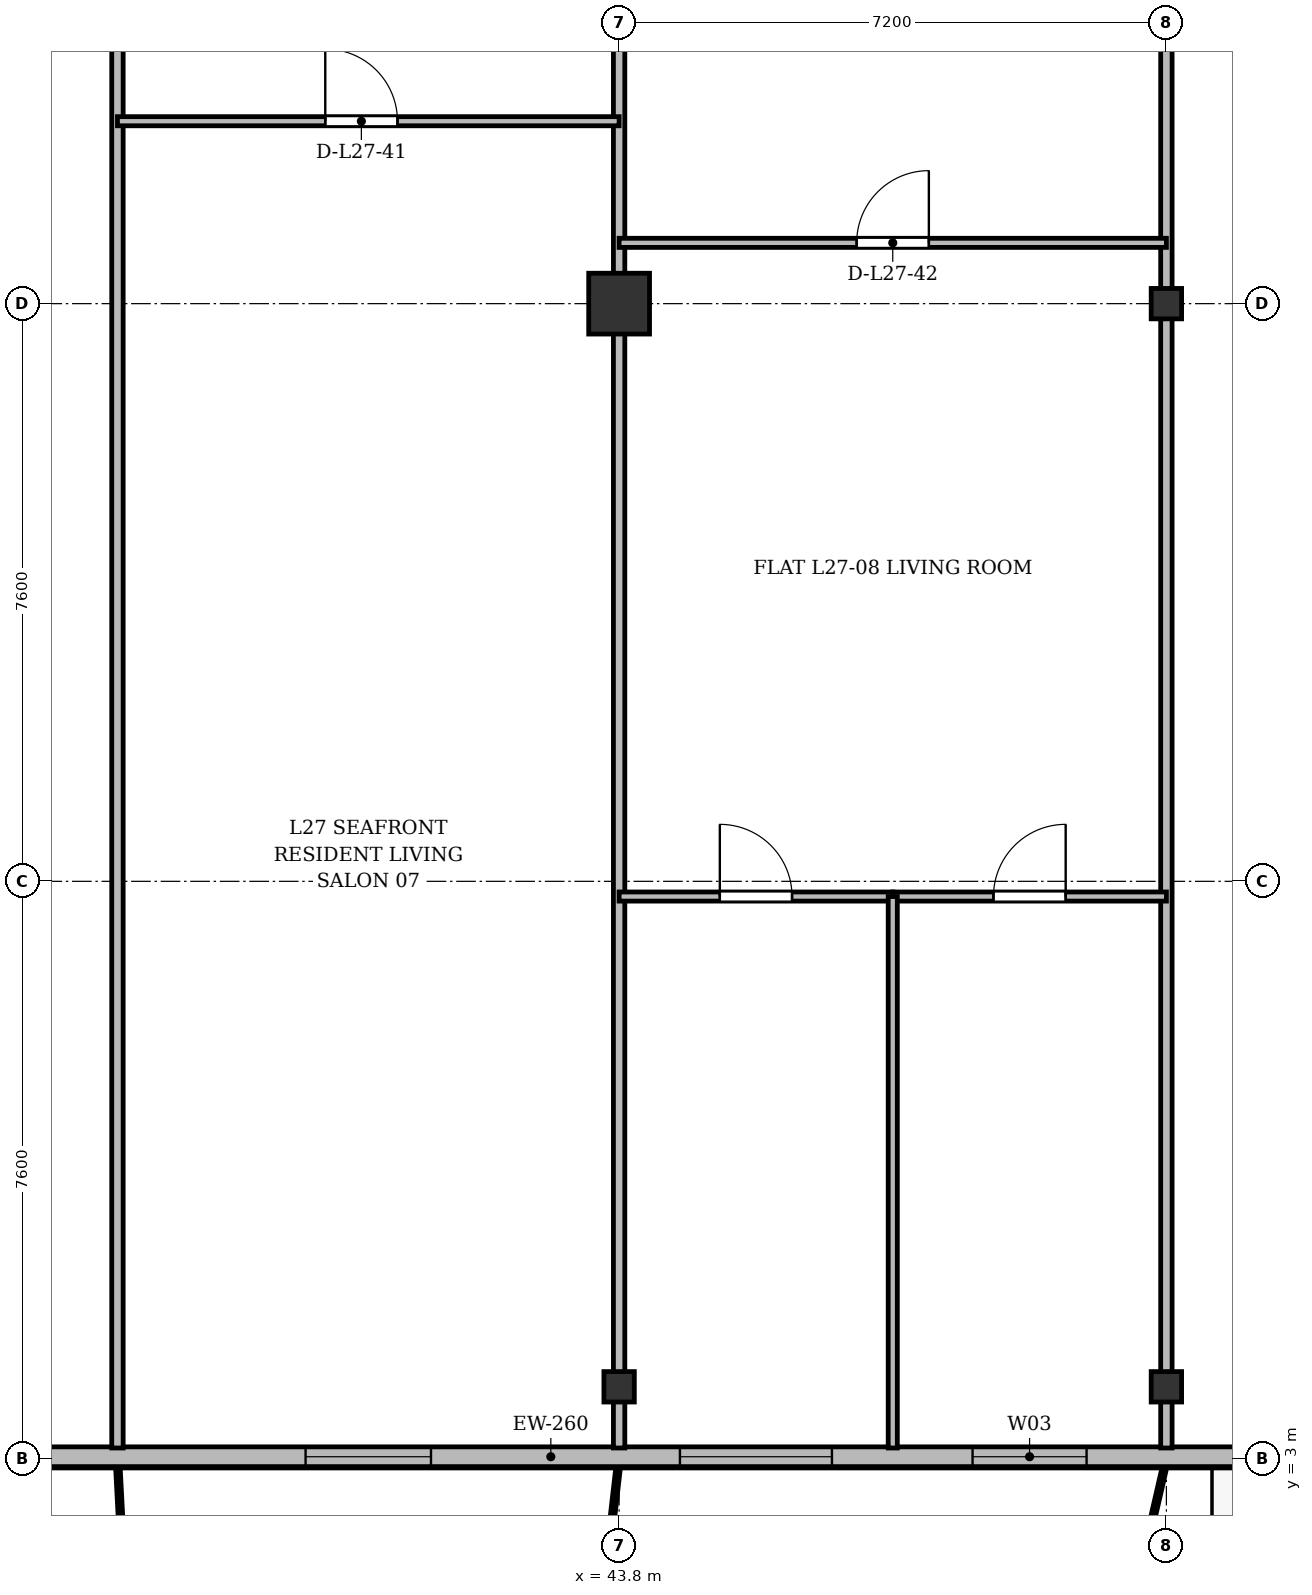
"""IFC4 building model, lengths in metres.
Left out: names, types, materials, properties, quantities, classifications, styles, units other than length and angle.
Written with IfcOpenShell. Run it as: python <this file> out.ifc"""

import sys

from ifc_helpers import new_model, si_unit, direction, frame, frame_2d, origin, origin_2d, place, context, subcontext, project, spatial, rectangle, i_section, extrude, source, transform, mapped, element, fill, save


model = new_model("IFC4")
c1 = context("Model", 3, precision=1e-05, world=origin(), true_north=direction((0.0, 1.0)))
c2 = subcontext(c1, "Body", "Model", "MODEL_VIEW")
j1 = project(units=[si_unit("LENGTHUNIT", "METRE"), si_unit("PLANEANGLEUNIT", "RADIAN")], contexts=[c1])
p1 = place(None, origin())
s1 = spatial("IfcSite", under=j1, at=p1, CompositionType="ELEMENT")
p2 = place(p1, origin())
s2 = spatial("IfcBuilding", under=s1, at=p2, CompositionType="ELEMENT")
p3 = place(p2, frame((0.0, 0.0, 106.9)))
s3 = spatial("IfcBuildingStorey", under=s2, at=p3, CompositionType="ELEMENT", Elevation=106.9)
m1 = source(origin(), c2, "Body", "SweptSolid", [
    extrude(i_section(OverallWidth=0.4, OverallDepth=0.4, WebThickness=0.022, FlangeThickness=0.035, at=origin_2d()), origin(), (0.0, 0.0, 1.0), 3.6),
])
p4 = place(p3, frame((43.8, 3.95, 0.0), z_axis=(0.0, 0.0, 1.0), x_axis=(1.0, 0.0, 0.0)))
e1 = element("IfcColumn", 1, at=p4, inside=s3, PredefinedType="COLUMN", context=c2, shape_type="MappedRepresentation", body=[
    mapped(m1, transform((0.0, 0.0, 0.0), x_axis=(1.0, 0.0, 0.0), y_axis=(0.0, 1.0, 0.0), z_axis=(0.0, 0.0, 1.0), scale=1.0)),
])
m2 = source(origin(), c2, "Body", "SweptSolid", [
    extrude(rectangle(XDim=0.8, YDim=0.8, at=origin_2d()), origin(), (0.0, 0.0, 1.0), 3.6),
])
p5 = place(p3, frame((43.8, 18.2, 0.0), z_axis=(0.0, 0.0, 1.0), x_axis=(1.0, 0.0, 0.0)))
e2 = element("IfcColumn", 2, at=p5, inside=s3, PredefinedType="COLUMN", context=c2, shape_type="MappedRepresentation", body=[
    mapped(m2, transform((0.0, 0.0, 0.0), x_axis=(1.0, 0.0, 0.0), y_axis=(0.0, 1.0, 0.0), z_axis=(0.0, 0.0, 1.0), scale=1.0)),
])
for number, where, z_axis, x_axis in (
    (3, (51.0, 3.95, 0.0), (0.0, 0.0, 1.0), (1.0, 0.0, 0.0)),
    (4, (51.0, 18.2, 0.0), (0.0, 0.0, 1.0), (1.0, 0.0, 0.0)),
):
    element("IfcColumn", number, at=place(p3, frame(where, z_axis=z_axis, x_axis=x_axis)), inside=s3, PredefinedType="COLUMN", context=c2, shape_type="MappedRepresentation", body=[
        mapped(m1, transform((0.0, 0.0, 0.0), x_axis=(1.0, 0.0, 0.0), y_axis=(0.0, 1.0, 0.0), z_axis=(0.0, 0.0, 1.0), scale=1.0)),
    ])
p6 = place(p3, frame((66.9, 3.03, 0.0), z_axis=(0.0, 0.0, 1.0), x_axis=(-1.0, 0.0, 0.0)))
e5 = element("IfcWall", 5, at=p6, inside=s3, PredefinedType="SOLIDWALL", context=c2, shape_type="SweptSolid", body=[
    extrude(rectangle(XDim=59.4, YDim=0.26, at=frame_2d((29.7, 0.0))), origin(), (0.0, 0.0, 1.0), 3.34),
])
p7 = place(p6, frame((2.0, 0.0, 0.9)))
e6 = element("IfcOpeningElement", 6, at=p7, cuts=e5, PredefinedType="OPENING", context=c2, shape_type="SweptSolid", body=[
    extrude(rectangle(XDim=2.0, YDim=1.95, at=frame_2d((1.0, 0.975))), frame((0.0, 0.14, 0.0), z_axis=(0.0, -1.0, 0.0), x_axis=(1.0, 0.0, 0.0)), (0.0, 0.0, 1.0), 0.28),
])
p8 = place(p6, frame((5.575, 0.0, 0.9)))
e7 = element("IfcOpeningElement", 7, at=p8, cuts=e5, PredefinedType="OPENING", context=c2, shape_type="SweptSolid", body=[
    extrude(rectangle(XDim=1.65, YDim=1.85, at=frame_2d((0.825, 0.925))), frame((0.0, 0.14, 0.0), z_axis=(0.0, -1.0, 0.0), x_axis=(1.0, 0.0, 0.0)), (0.0, 0.0, 1.0), 0.28),
])
p9 = place(p6, frame((9.213, 0.0, 0.0)))
e8 = element("IfcOpeningElement", 8, at=p9, cuts=e5, PredefinedType="OPENING", context=c2, shape_type="SweptSolid", body=[
    extrude(rectangle(XDim=1.2, YDim=2.2, at=frame_2d((0.6, 1.1))), frame((0.0, 0.14, 0.0), z_axis=(0.0, -1.0, 0.0), x_axis=(1.0, 0.0, 0.0)), (0.0, 0.0, 1.0), 0.28),
])
p10 = place(p6, frame((12.8, 0.0, 0.9)))
e9 = element("IfcOpeningElement", 9, at=p10, cuts=e5, PredefinedType="OPENING", context=c2, shape_type="SweptSolid", body=[
    extrude(rectangle(XDim=2.2, YDim=1.8, at=frame_2d((1.1, 0.9))), frame((0.0, 0.14, 0.0), z_axis=(0.0, -1.0, 0.0), x_axis=(1.0, 0.0, 0.0)), (0.0, 0.0, 1.0), 0.28),
])
p11 = place(p6, frame((16.95, 0.0, 0.9)))
e10 = element("IfcOpeningElement", 10, at=p11, cuts=e5, PredefinedType="OPENING", context=c2, shape_type="SweptSolid", body=[
    extrude(rectangle(XDim=1.5, YDim=1.75, at=frame_2d((0.75, 0.875))), frame((0.0, 0.14, 0.0), z_axis=(0.0, -1.0, 0.0), x_axis=(1.0, 0.0, 0.0)), (0.0, 0.0, 1.0), 0.28),
])
p12 = place(p6, frame((20.3, 0.0, 0.9)))
e11 = element("IfcOpeningElement", 11, at=p12, cuts=e5, PredefinedType="OPENING", context=c2, shape_type="SweptSolid", body=[
    extrude(rectangle(XDim=2.0, YDim=1.95, at=frame_2d((1.0, 0.975))), frame((0.0, 0.14, 0.0), z_axis=(0.0, -1.0, 0.0), x_axis=(1.0, 0.0, 0.0)), (0.0, 0.0, 1.0), 0.28),
])
p13 = place(p6, frame((25.575, 0.0, 0.9)))
e12 = element("IfcOpeningElement", 12, at=p13, cuts=e5, PredefinedType="OPENING", context=c2, shape_type="SweptSolid", body=[
    extrude(rectangle(XDim=1.65, YDim=1.85, at=frame_2d((0.825, 0.925))), frame((0.0, 0.14, 0.0), z_axis=(0.0, -1.0, 0.0), x_axis=(1.0, 0.0, 0.0)), (0.0, 0.0, 1.0), 0.28),
])
p14 = place(p6, frame((32.1, 0.0, 0.9)))
e13 = element("IfcOpeningElement", 13, at=p14, cuts=e5, PredefinedType="OPENING", context=c2, shape_type="SweptSolid", body=[
    extrude(rectangle(XDim=1.8, YDim=1.8, at=frame_2d((0.9, 0.9))), frame((0.0, 0.14, 0.0), z_axis=(0.0, -1.0, 0.0), x_axis=(1.0, 0.0, 0.0)), (0.0, 0.0, 1.0), 0.28),
])
p15 = place(p6, frame((37.584, 0.0, 0.0)))
e14 = element("IfcOpeningElement", 14, at=p15, cuts=e5, PredefinedType="OPENING", context=c2, shape_type="SweptSolid", body=[
    extrude(rectangle(XDim=1.2, YDim=2.2, at=frame_2d((0.6, 1.1))), frame((0.0, 0.14, 0.0), z_axis=(0.0, -1.0, 0.0), x_axis=(1.0, 0.0, 0.0)), (0.0, 0.0, 1.0), 0.28),
])
p16 = place(p6, frame((40.85, 0.0, 0.9)))
e15 = element("IfcOpeningElement", 15, at=p16, cuts=e5, PredefinedType="OPENING", context=c2, shape_type="SweptSolid", body=[
    extrude(rectangle(XDim=1.5, YDim=1.75, at=frame_2d((0.75, 0.875))), frame((0.0, 0.14, 0.0), z_axis=(0.0, -1.0, 0.0), x_axis=(1.0, 0.0, 0.0)), (0.0, 0.0, 1.0), 0.28),
])
p17 = place(p6, frame((46.4, 0.0, 0.9)))
e16 = element("IfcOpeningElement", 16, at=p17, cuts=e5, PredefinedType="OPENING", context=c2, shape_type="SweptSolid", body=[
    extrude(rectangle(XDim=2.0, YDim=1.95, at=frame_2d((1.0, 0.975))), frame((0.0, 0.14, 0.0), z_axis=(0.0, -1.0, 0.0), x_axis=(1.0, 0.0, 0.0)), (0.0, 0.0, 1.0), 0.28),
])
p18 = place(p6, frame((55.817, 0.0, 0.0)))
e17 = element("IfcOpeningElement", 17, at=p18, cuts=e5, PredefinedType="OPENING", context=c2, shape_type="SweptSolid", body=[
    extrude(rectangle(XDim=1.2, YDim=2.2, at=frame_2d((0.6, 1.1))), frame((0.0, 0.14, 0.0), z_axis=(0.0, -1.0, 0.0), x_axis=(1.0, 0.0, 0.0)), (0.0, 0.0, 1.0), 0.28),
])
p19 = place(p3, frame((37.2, 3.145, 0.0), z_axis=(0.0, 0.0, 1.0), x_axis=(0.0, 1.0, 0.0)))
e18 = element("IfcWall", 18, at=p19, inside=s3, PredefinedType="PARTITIONING", context=c2, shape_type="SweptSolid", body=[
    extrude(rectangle(XDim=24.455, YDim=0.15, at=frame_2d((12.228, 0.0))), origin(), (0.0, 0.0, 1.0), 2.752),
])
for number, where, z_axis, x_axis in (
    (19, (43.8, 3.145, 0.0), (0.0, 0.0, 1.0), (0.0, 1.0, 0.0)),
    (20, (51.0, 3.145, 0.0), (0.0, 0.0, 1.0), (0.0, 1.0, 0.0)),
):
    element("IfcWall", number, at=place(p3, frame(where, z_axis=z_axis, x_axis=x_axis)), inside=s3, PredefinedType="PARTITIONING", context=c2, shape_type="SweptSolid", body=[
        extrude(rectangle(XDim=24.455, YDim=0.15, at=frame_2d((12.228, 0.0))), origin(), (0.0, 0.0, 1.0), 2.84),
    ])
p20 = place(p3, frame((37.2, 20.6, 0.0), z_axis=(0.0, 0.0, 1.0), x_axis=(1.0, 0.0, 0.0)))
e21 = element("IfcWall", 21, at=p20, inside=s3, PredefinedType="PARTITIONING", context=c2, shape_type="SweptSolid", body=[
    extrude(rectangle(XDim=6.6, YDim=0.12, at=frame_2d((3.3, 0.0))), origin(), (0.0, 0.0, 1.0), 2.84),
])
p21 = place(p20, frame((2.734, 0.0, 0.0)))
e22 = element("IfcOpeningElement", 22, at=p21, cuts=e21, PredefinedType="OPENING", context=c2, shape_type="SweptSolid", body=[
    extrude(rectangle(XDim=0.95, YDim=2.15, at=frame_2d((0.475, 1.075))), frame((0.0, 0.07, 0.0), z_axis=(0.0, -1.0, 0.0), x_axis=(1.0, 0.0, 0.0)), (0.0, 0.0, 1.0), 0.14),
])
p22 = place(p3, frame((43.8, 19.0, 0.0), z_axis=(0.0, 0.0, 1.0), x_axis=(1.0, 0.0, 0.0)))
e23 = element("IfcWall", 23, at=p22, inside=s3, PredefinedType="PARTITIONING", context=c2, shape_type="SweptSolid", body=[
    extrude(rectangle(XDim=7.2, YDim=0.12, at=frame_2d((3.6, 0.0))), origin(), (0.0, 0.0, 1.0), 2.84),
])
p23 = place(p22, frame((3.125, 0.0, 0.0)))
e24 = element("IfcOpeningElement", 24, at=p23, cuts=e23, PredefinedType="OPENING", context=c2, shape_type="SweptSolid", body=[
    extrude(rectangle(XDim=0.95, YDim=2.15, at=frame_2d((0.475, 1.075))), frame((0.0, 0.07, 0.0), z_axis=(0.0, -1.0, 0.0), x_axis=(1.0, 0.0, 0.0)), (0.0, 0.0, 1.0), 0.14),
])
p24 = place(p3, frame((43.8, 10.4, 0.0), z_axis=(0.0, 0.0, 1.0), x_axis=(1.0, 0.0, 0.0)))
e25 = element("IfcWall", 25, at=p24, inside=s3, PredefinedType="PARTITIONING", context=c2, shape_type="SweptSolid", body=[
    extrude(rectangle(XDim=3.6, YDim=0.12, at=frame_2d((1.8, 0.0))), origin(), (0.0, 0.0, 1.0), 2.84),
])
p25 = place(p24, frame((1.325, 0.0, 0.0)))
e26 = element("IfcOpeningElement", 26, at=p25, cuts=e25, PredefinedType="OPENING", context=c2, shape_type="SweptSolid", body=[
    extrude(rectangle(XDim=0.95, YDim=2.15, at=frame_2d((0.475, 1.075))), frame((0.0, 0.07, 0.0), z_axis=(0.0, -1.0, 0.0), x_axis=(1.0, 0.0, 0.0)), (0.0, 0.0, 1.0), 0.14),
])
p26 = place(p3, frame((47.4, 10.4, 0.0), z_axis=(0.0, 0.0, 1.0), x_axis=(1.0, 0.0, 0.0)))
e27 = element("IfcWall", 27, at=p26, inside=s3, PredefinedType="PARTITIONING", context=c2, shape_type="SweptSolid", body=[
    extrude(rectangle(XDim=3.6, YDim=0.12, at=frame_2d((1.8, 0.0))), origin(), (0.0, 0.0, 1.0), 2.84),
])
p27 = place(p26, frame((1.325, 0.0, 0.0)))
e28 = element("IfcOpeningElement", 28, at=p27, cuts=e27, PredefinedType="OPENING", context=c2, shape_type="SweptSolid", body=[
    extrude(rectangle(XDim=0.95, YDim=2.15, at=frame_2d((0.475, 1.075))), frame((0.0, 0.07, 0.0), z_axis=(0.0, -1.0, 0.0), x_axis=(1.0, 0.0, 0.0)), (0.0, 0.0, 1.0), 0.14),
])
p28 = place(p3, frame((47.4, 3.145, 0.0), z_axis=(0.0, 0.0, 1.0), x_axis=(0.0, 1.0, 0.0)))
e29 = element("IfcWall", 29, at=p28, inside=s3, PredefinedType="PARTITIONING", context=c2, shape_type="SweptSolid", body=[
    extrude(rectangle(XDim=7.255, YDim=0.12, at=frame_2d((3.627, 0.0))), origin(), (0.0, 0.0, 1.0), 2.752),
])
m3 = source(origin(), c2, "Body", "SweptSolid", [
    extrude(rectangle(XDim=1.5, YDim=1.75, at=frame_2d((0.75, 0.875))), frame((0.0, 0.03, 0.0), z_axis=(0.0, -1.0, 0.0), x_axis=(1.0, 0.0, 0.0)), (0.0, 0.0, 1.0), 0.06),
])
p29 = place(p11, origin())
e30 = element("IfcWindow", 30, at=p29, inside=s3, PartitioningType="SINGLE_PANEL", PredefinedType="WINDOW", context=c2, shape_type="MappedRepresentation", body=[
    mapped(m3, transform((0.0, 0.0, 0.0), x_axis=(1.0, 0.0, 0.0), y_axis=(0.0, 1.0, 0.0), z_axis=(0.0, 0.0, 1.0), scale=1.0)),
])
fill(e10, e30)
m4 = source(origin(), c2, "Body", "SweptSolid", [
    extrude(rectangle(XDim=2.0, YDim=1.95, at=frame_2d((1.0, 0.975))), frame((0.0, 0.03, 0.0), z_axis=(0.0, -1.0, 0.0), x_axis=(1.0, 0.0, 0.0)), (0.0, 0.0, 1.0), 0.06),
])
p30 = place(p12, origin())
e31 = element("IfcWindow", 31, at=p30, inside=s3, PartitioningType="SINGLE_PANEL", PredefinedType="WINDOW", context=c2, shape_type="MappedRepresentation", body=[
    mapped(m4, transform((0.0, 0.0, 0.0), x_axis=(1.0, 0.0, 0.0), y_axis=(0.0, 1.0, 0.0), z_axis=(0.0, 0.0, 1.0), scale=1.0)),
])
fill(e11, e31)
m5 = source(origin(), c2, "Body", "SweptSolid", [
    extrude(rectangle(XDim=1.65, YDim=1.85, at=frame_2d((0.825, 0.925))), frame((0.0, 0.03, 0.0), z_axis=(0.0, -1.0, 0.0), x_axis=(1.0, 0.0, 0.0)), (0.0, 0.0, 1.0), 0.06),
])
p31 = place(p13, origin())
e32 = element("IfcWindow", 32, at=p31, inside=s3, PartitioningType="SINGLE_PANEL", PredefinedType="WINDOW", context=c2, shape_type="MappedRepresentation", body=[
    mapped(m5, transform((0.0, 0.0, 0.0), x_axis=(1.0, 0.0, 0.0), y_axis=(0.0, 1.0, 0.0), z_axis=(0.0, 0.0, 1.0), scale=1.0)),
])
fill(e12, e32)
m6 = source(origin(), c2, "Body", "SweptSolid", [
    extrude(rectangle(XDim=0.95, YDim=2.15, at=frame_2d((0.475, 1.075))), frame((0.0, 0.025, 0.0), z_axis=(0.0, -1.0, 0.0), x_axis=(1.0, 0.0, 0.0)), (0.0, 0.0, 1.0), 0.05),
])
p32 = place(p21, origin())
e33 = element("IfcDoor", 33, at=p32, inside=s3, OperationType="SINGLE_SWING_LEFT", PredefinedType="DOOR", context=c2, shape_type="MappedRepresentation", body=[
    mapped(m6, transform((0.0, 0.0, 0.0), x_axis=(1.0, 0.0, 0.0), y_axis=(0.0, 1.0, 0.0), z_axis=(0.0, 0.0, 1.0), scale=1.0)),
])
fill(e22, e33)
p33 = place(p23, origin())
e34 = element("IfcDoor", 34, at=p33, inside=s3, OperationType="SINGLE_SWING_RIGHT", PredefinedType="DOOR", context=c2, shape_type="MappedRepresentation", body=[
    mapped(m6, transform((0.0, 0.0, 0.0), x_axis=(1.0, 0.0, 0.0), y_axis=(0.0, 1.0, 0.0), z_axis=(0.0, 0.0, 1.0), scale=1.0)),
])
fill(e24, e34)
p34 = place(p25, origin())
e35 = element("IfcDoor", 35, at=p34, inside=s3, OperationType="SINGLE_SWING_LEFT", PredefinedType="DOOR", context=c2, shape_type="MappedRepresentation", body=[
    mapped(m6, transform((0.0, 0.0, 0.0), x_axis=(1.0, 0.0, 0.0), y_axis=(0.0, 1.0, 0.0), z_axis=(0.0, 0.0, 1.0), scale=1.0)),
])
fill(e26, e35)
p35 = place(p27, origin())
e36 = element("IfcDoor", 36, at=p35, inside=s3, OperationType="SINGLE_SWING_RIGHT", PredefinedType="DOOR", context=c2, shape_type="MappedRepresentation", body=[
    mapped(m6, transform((0.0, 0.0, 0.0), x_axis=(1.0, 0.0, 0.0), y_axis=(0.0, 1.0, 0.0), z_axis=(0.0, 0.0, 1.0), scale=1.0)),
])
fill(e28, e36)
save(model, sys.argv[1])
